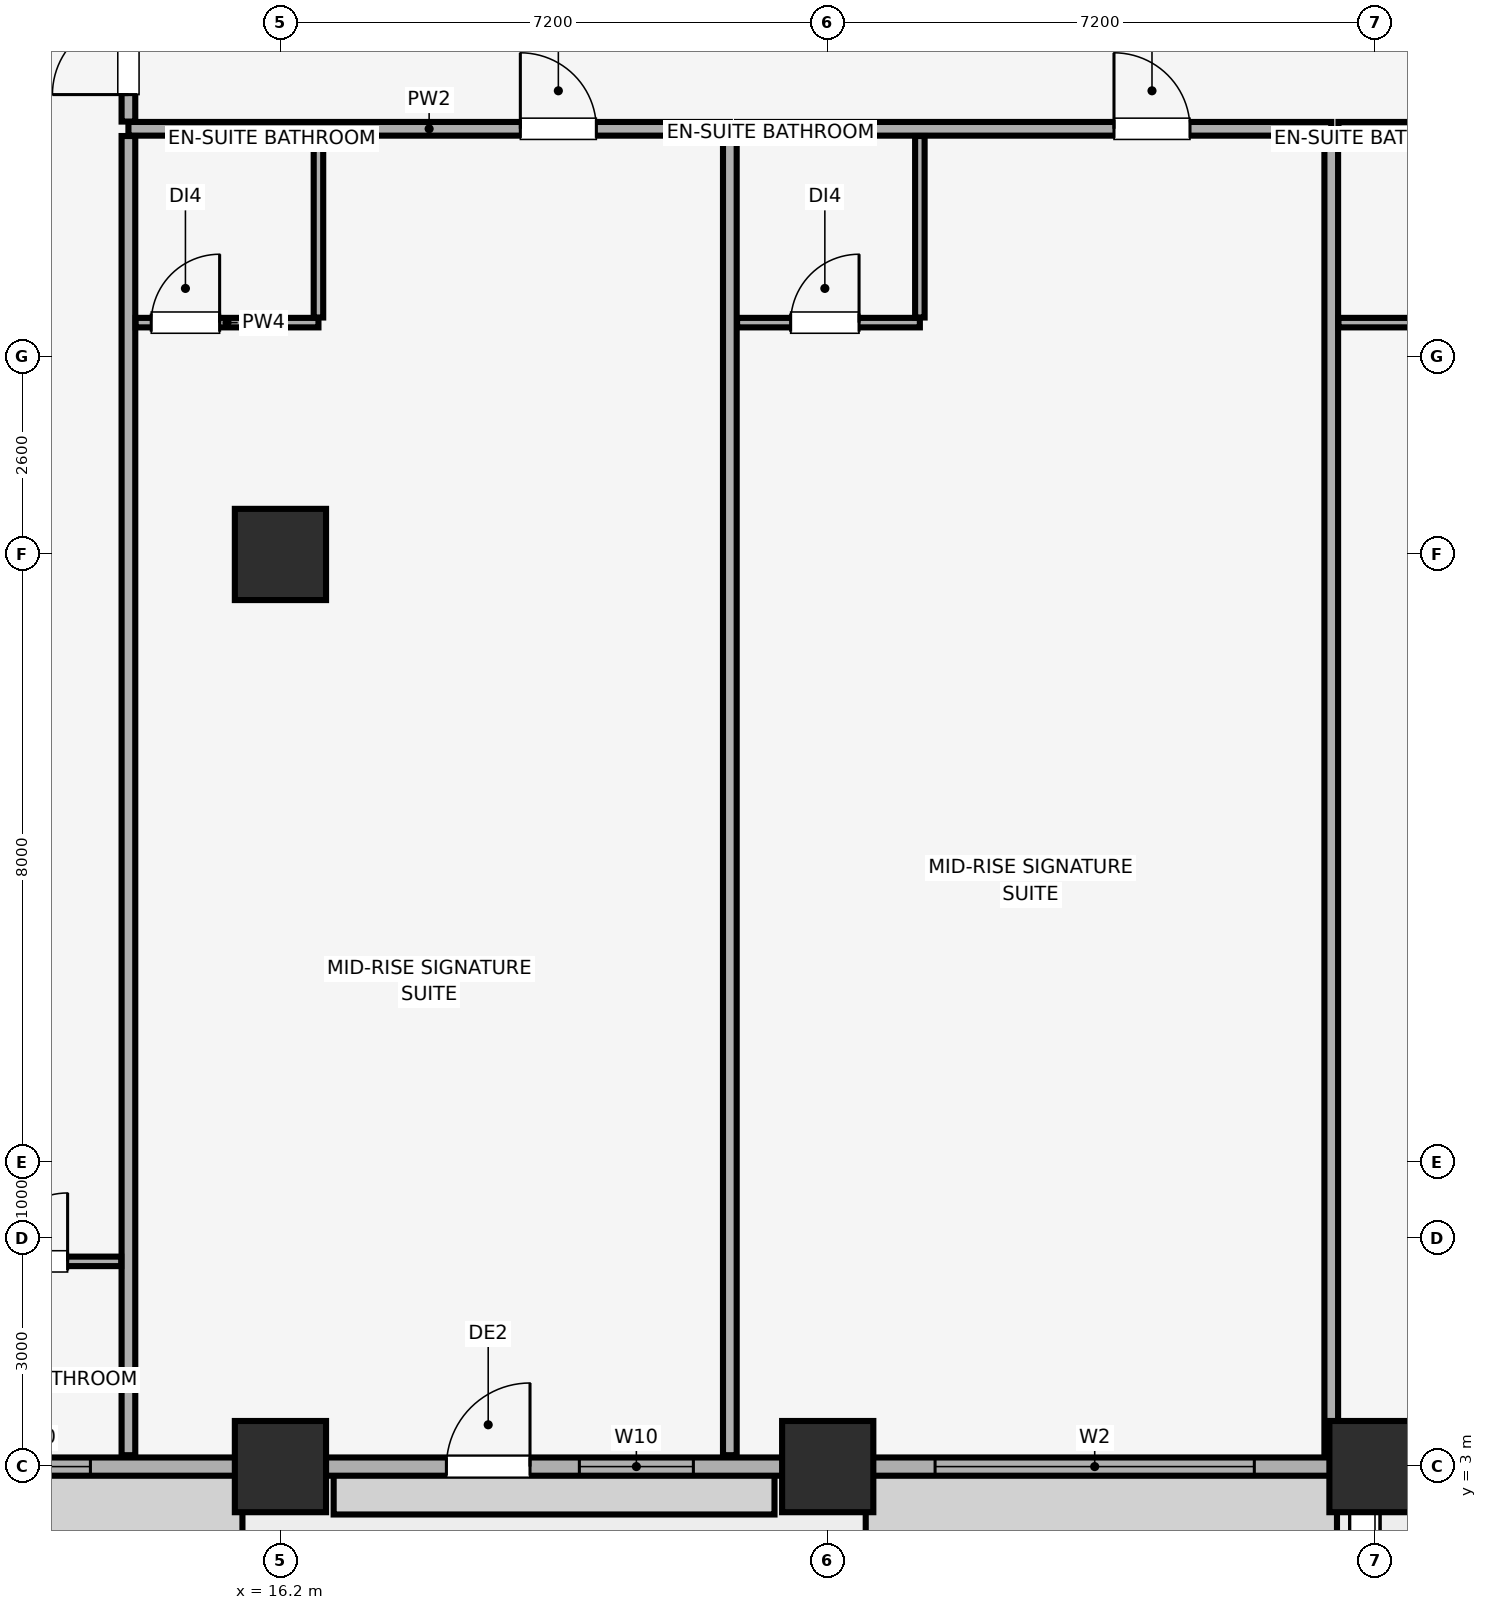
"""IFC4 building model, lengths in metres.
Left out: names, types, materials, properties, quantities, classifications, styles, units other than length and angle.
Written with IfcOpenShell. Run it as: python <this file> out.ifc"""

import sys

from ifc_helpers import new_model, si_unit, direction, frame, frame_2d, origin, origin_2d, place, context, subcontext, project, spatial, rectangle, extrude, element, fill, save


model = new_model("IFC4")
c1 = context("Model", 3, precision=1e-05, world=origin(), true_north=direction((0.0, 1.0)))
c2 = subcontext(c1, "Body", "Model", "MODEL_VIEW")
j1 = project(units=[si_unit("LENGTHUNIT", "METRE"), si_unit("PLANEANGLEUNIT", "RADIAN")], contexts=[c1])
p1 = place(None, origin())
s1 = spatial("IfcSite", under=j1, at=p1, CompositionType="ELEMENT")
p2 = place(p1, origin())
s2 = spatial("IfcBuilding", under=s1, at=p2, CompositionType="ELEMENT")
p3 = place(p2, frame((0.0, 0.0, 180.95)))
s3 = spatial("IfcBuildingStorey", under=s2, at=p3, CompositionType="ELEMENT", Elevation=180.95)
for number, where, z_axis, x_axis in (
    (1, (16.2, 3.0, 0.0), (0.0, 0.0, 1.0), (1.0, 0.0, 0.0)),
    (2, (23.4, 3.0, 0.0), (0.0, 0.0, 1.0), (1.0, 0.0, 0.0)),
    (3, (30.6, 3.0, 0.0), (0.0, 0.0, 1.0), (1.0, 0.0, 0.0)),
    (4, (16.2, 15.0, 0.0), (0.0, 0.0, 1.0), (1.0, 0.0, 0.0)),
):
    element("IfcColumn", number, at=place(p3, frame(where, z_axis=z_axis, x_axis=x_axis)), inside=s3, PredefinedType="COLUMN", context=c2, shape_type="SweptSolid", body=[
        extrude(rectangle(XDim=1.2, YDim=1.2, at=origin_2d()), origin(), (0.0, 0.0, 1.0), 3.45),
    ])
p4 = place(p3, frame((7.0, 3.0, 0.0), z_axis=(0.0, 0.0, 1.0), x_axis=(1.0, 0.0, 0.0)))
e5 = element("IfcWall", 5, at=p4, inside=s3, PredefinedType="SOLIDWALL", context=c2, shape_type="SweptSolid", body=[
    extrude(rectangle(XDim=70.0, YDim=0.24, at=frame_2d((35.0, 0.0))), origin(), (0.0, 0.0, 1.0), 2.65),
])
p5 = place(p4, frame((11.383, 0.0, 0.0)))
e6 = element("IfcOpeningElement", 6, at=p5, cuts=e5, PredefinedType="OPENING", context=c2, shape_type="SweptSolid", body=[
    extrude(rectangle(XDim=1.1, YDim=2.15, at=frame_2d((0.55, 1.075))), frame((0.0, 0.13, 0.0), z_axis=(0.0, -1.0, 0.0), x_axis=(1.0, 0.0, 0.0)), (0.0, 0.0, 1.0), 0.26),
])
p6 = place(p4, frame((34.45, 0.0, 0.0)))
e7 = element("IfcOpeningElement", 7, at=p6, cuts=e5, PredefinedType="OPENING", context=c2, shape_type="SweptSolid", body=[
    extrude(rectangle(XDim=1.1, YDim=2.15, at=frame_2d((0.55, 1.075))), frame((0.0, 0.13, 0.0), z_axis=(0.0, -1.0, 0.0), x_axis=(1.0, 0.0, 0.0)), (0.0, 0.0, 1.0), 0.26),
])
p7 = place(p4, frame((57.517, 0.0, 0.0)))
e8 = element("IfcOpeningElement", 8, at=p7, cuts=e5, PredefinedType="OPENING", context=c2, shape_type="SweptSolid", body=[
    extrude(rectangle(XDim=1.1, YDim=2.15, at=frame_2d((0.55, 1.075))), frame((0.0, 0.13, 0.0), z_axis=(0.0, -1.0, 0.0), x_axis=(1.0, 0.0, 0.0)), (0.0, 0.0, 1.0), 0.26),
])
p8 = place(p4, frame((5.2, 0.0, 0.85)))
e9 = element("IfcOpeningElement", 9, at=p8, cuts=e5, PredefinedType="OPENING", context=c2, shape_type="SweptSolid", body=[
    extrude(rectangle(XDim=1.5, YDim=1.4, at=frame_2d((0.75, 0.7))), frame((0.0, 0.13, 0.0), z_axis=(0.0, -1.0, 0.0), x_axis=(1.0, 0.0, 0.0)), (0.0, 0.0, 1.0), 0.26),
])
p9 = place(p4, frame((13.133, 0.0, 0.85)))
e10 = element("IfcOpeningElement", 10, at=p9, cuts=e5, PredefinedType="OPENING", context=c2, shape_type="SweptSolid", body=[
    extrude(rectangle(XDim=1.5, YDim=1.4, at=frame_2d((0.75, 0.7))), frame((0.0, 0.13, 0.0), z_axis=(0.0, -1.0, 0.0), x_axis=(1.0, 0.0, 0.0)), (0.0, 0.0, 1.0), 0.26),
])
p10 = place(p4, frame((17.812, 0.0, 0.85)))
e11 = element("IfcOpeningElement", 11, at=p10, cuts=e5, PredefinedType="OPENING", context=c2, shape_type="SweptSolid", body=[
    extrude(rectangle(XDim=4.2, YDim=1.65, at=frame_2d((2.1, 0.825))), frame((0.0, 0.13, 0.0), z_axis=(0.0, -1.0, 0.0), x_axis=(1.0, 0.0, 0.0)), (0.0, 0.0, 1.0), 0.26),
])
p11 = place(p4, frame((25.1, 0.0, 0.85)))
e12 = element("IfcOpeningElement", 12, at=p11, cuts=e5, PredefinedType="OPENING", context=c2, shape_type="SweptSolid", body=[
    extrude(rectangle(XDim=4.2, YDim=1.65, at=frame_2d((2.1, 0.825))), frame((0.0, 0.13, 0.0), z_axis=(0.0, -1.0, 0.0), x_axis=(1.0, 0.0, 0.0)), (0.0, 0.0, 1.0), 0.26),
])
p12 = place(p4, frame((31.99, 0.0, 0.85)))
e13 = element("IfcOpeningElement", 13, at=p12, cuts=e5, PredefinedType="OPENING", context=c2, shape_type="SweptSolid", body=[
    extrude(rectangle(XDim=1.5, YDim=1.4, at=frame_2d((0.75, 0.7))), frame((0.0, 0.13, 0.0), z_axis=(0.0, -1.0, 0.0), x_axis=(1.0, 0.0, 0.0)), (0.0, 0.0, 1.0), 0.26),
])
p13 = place(p4, frame((36.51, 0.0, 0.85)))
e14 = element("IfcOpeningElement", 14, at=p13, cuts=e5, PredefinedType="OPENING", context=c2, shape_type="SweptSolid", body=[
    extrude(rectangle(XDim=1.5, YDim=1.4, at=frame_2d((0.75, 0.7))), frame((0.0, 0.13, 0.0), z_axis=(0.0, -1.0, 0.0), x_axis=(1.0, 0.0, 0.0)), (0.0, 0.0, 1.0), 0.26),
])
p14 = place(p4, frame((40.7, 0.0, 0.85)))
e15 = element("IfcOpeningElement", 15, at=p14, cuts=e5, PredefinedType="OPENING", context=c2, shape_type="SweptSolid", body=[
    extrude(rectangle(XDim=4.2, YDim=1.65, at=frame_2d((2.1, 0.825))), frame((0.0, 0.13, 0.0), z_axis=(0.0, -1.0, 0.0), x_axis=(1.0, 0.0, 0.0)), (0.0, 0.0, 1.0), 0.26),
])
p15 = place(p4, frame((47.9, 0.0, 0.85)))
e16 = element("IfcOpeningElement", 16, at=p15, cuts=e5, PredefinedType="OPENING", context=c2, shape_type="SweptSolid", body=[
    extrude(rectangle(XDim=4.2, YDim=1.65, at=frame_2d((2.1, 0.825))), frame((0.0, 0.13, 0.0), z_axis=(0.0, -1.0, 0.0), x_axis=(1.0, 0.0, 0.0)), (0.0, 0.0, 1.0), 0.26),
])
p16 = place(p4, frame((55.314, 0.0, 0.85)))
e17 = element("IfcOpeningElement", 17, at=p16, cuts=e5, PredefinedType="OPENING", context=c2, shape_type="SweptSolid", body=[
    extrude(rectangle(XDim=1.5, YDim=1.4, at=frame_2d((0.75, 0.7))), frame((0.0, 0.13, 0.0), z_axis=(0.0, -1.0, 0.0), x_axis=(1.0, 0.0, 0.0)), (0.0, 0.0, 1.0), 0.26),
])
p17 = place(p4, frame((63.3, 0.0, 0.85)))
e18 = element("IfcOpeningElement", 18, at=p17, cuts=e5, PredefinedType="OPENING", context=c2, shape_type="SweptSolid", body=[
    extrude(rectangle(XDim=1.5, YDim=1.4, at=frame_2d((0.75, 0.7))), frame((0.0, 0.13, 0.0), z_axis=(0.0, -1.0, 0.0), x_axis=(1.0, 0.0, 0.0)), (0.0, 0.0, 1.0), 0.26),
])
p18 = place(p3, frame((14.2, 20.6, 0.0), z_axis=(0.0, 0.0, 1.0), x_axis=(1.0, 0.0, 0.0)))
e19 = element("IfcWall", 19, at=p18, inside=s3, PredefinedType="PARTITIONING", context=c2, shape_type="SweptSolid", body=[
    extrude(rectangle(XDim=7.912, YDim=0.18, at=frame_2d((3.956, 0.0))), origin(), (0.0, 0.0, 1.0), 3.45),
])
p19 = place(p18, frame((5.156, 0.0, 0.0)))
e20 = element("IfcOpeningElement", 20, at=p19, cuts=e19, PredefinedType="OPENING", context=c2, shape_type="SweptSolid", body=[
    extrude(rectangle(XDim=1.0, YDim=2.15, at=frame_2d((0.5, 1.075))), frame((0.0, 0.1, 0.0), z_axis=(0.0, -1.0, 0.0), x_axis=(1.0, 0.0, 0.0)), (0.0, 0.0, 1.0), 0.2),
])
for number, where, z_axis, x_axis in (
    (21, (14.2, 3.15, 0.0), (0.0, 0.0, 1.0), (0.0, 1.0, 0.0)),
    (22, (22.112, 3.15, 0.0), (0.0, 0.0, 1.0), (0.0, 1.0, 0.0)),
):
    element("IfcWall", number, at=place(p3, frame(where, z_axis=z_axis, x_axis=x_axis)), inside=s3, PredefinedType="PARTITIONING", context=c2, shape_type="SweptSolid", body=[
        extrude(rectangle(XDim=17.355, YDim=0.18, at=frame_2d((8.677, 0.0))), origin(), (0.0, 0.0, 1.0), 3.45),
    ])
p20 = place(p3, frame((14.295, 18.05, 0.0), z_axis=(0.0, 0.0, 1.0), x_axis=(1.0, 0.0, 0.0)))
e23 = element("IfcWall", 23, at=p20, inside=s3, PredefinedType="PARTITIONING", context=c2, shape_type="SweptSolid", body=[
    extrude(rectangle(XDim=2.405, YDim=0.125, at=frame_2d((1.203, 0.0))), origin(), (0.0, 0.0, 1.0), 3.45),
])
p21 = place(p20, frame((0.205, 0.0, 0.0)))
e24 = element("IfcOpeningElement", 24, at=p21, cuts=e23, PredefinedType="OPENING", context=c2, shape_type="SweptSolid", body=[
    extrude(rectangle(XDim=0.9, YDim=2.1, at=frame_2d((0.45, 1.05))), frame((0.0, 0.073, 0.0), z_axis=(0.0, -1.0, 0.0), x_axis=(1.0, 0.0, 0.0)), (0.0, 0.0, 1.0), 0.145),
])
p22 = place(p3, frame((16.7, 18.117, 0.0), z_axis=(0.0, 0.0, 1.0), x_axis=(0.0, 1.0, 0.0)))
e25 = element("IfcWall", 25, at=p22, inside=s3, PredefinedType="PARTITIONING", context=c2, shape_type="SweptSolid", body=[
    extrude(rectangle(XDim=2.387, YDim=0.125, at=frame_2d((1.194, 0.0))), origin(), (0.0, 0.0, 1.0), 3.45),
])
p23 = place(p3, frame((22.207, 20.6, 0.0), z_axis=(0.0, 0.0, 1.0), x_axis=(1.0, 0.0, 0.0)))
e26 = element("IfcWall", 26, at=p23, inside=s3, PredefinedType="PARTITIONING", context=c2, shape_type="SweptSolid", body=[
    extrude(rectangle(XDim=7.817, YDim=0.18, at=frame_2d((3.909, 0.0))), origin(), (0.0, 0.0, 1.0), 3.45),
])
p24 = place(p23, frame((4.959, 0.0, 0.0)))
e27 = element("IfcOpeningElement", 27, at=p24, cuts=e26, PredefinedType="OPENING", context=c2, shape_type="SweptSolid", body=[
    extrude(rectangle(XDim=1.0, YDim=2.15, at=frame_2d((0.5, 1.075))), frame((0.0, 0.1, 0.0), z_axis=(0.0, -1.0, 0.0), x_axis=(1.0, 0.0, 0.0)), (0.0, 0.0, 1.0), 0.2),
])
p25 = place(p3, frame((30.025, 3.15, 0.0), z_axis=(0.0, 0.0, 1.0), x_axis=(0.0, 1.0, 0.0)))
e28 = element("IfcWall", 28, at=p25, inside=s3, PredefinedType="PARTITIONING", context=c2, shape_type="SweptSolid", body=[
    extrude(rectangle(XDim=17.355, YDim=0.18, at=frame_2d((8.677, 0.0))), origin(), (0.0, 0.0, 1.0), 3.45),
])
p26 = place(p3, frame((22.207, 18.05, 0.0), z_axis=(0.0, 0.0, 1.0), x_axis=(1.0, 0.0, 0.0)))
e29 = element("IfcWall", 29, at=p26, inside=s3, PredefinedType="PARTITIONING", context=c2, shape_type="SweptSolid", body=[
    extrude(rectangle(XDim=2.405, YDim=0.125, at=frame_2d((1.203, 0.0))), origin(), (0.0, 0.0, 1.0), 3.45),
])
p27 = place(p26, frame((0.705, 0.0, 0.0)))
e30 = element("IfcOpeningElement", 30, at=p27, cuts=e29, PredefinedType="OPENING", context=c2, shape_type="SweptSolid", body=[
    extrude(rectangle(XDim=0.9, YDim=2.1, at=frame_2d((0.45, 1.05))), frame((0.0, 0.073, 0.0), z_axis=(0.0, -1.0, 0.0), x_axis=(1.0, 0.0, 0.0)), (0.0, 0.0, 1.0), 0.145),
])
p28 = place(p3, frame((24.612, 18.117, 0.0), z_axis=(0.0, 0.0, 1.0), x_axis=(0.0, 1.0, 0.0)))
e31 = element("IfcWall", 31, at=p28, inside=s3, PredefinedType="PARTITIONING", context=c2, shape_type="SweptSolid", body=[
    extrude(rectangle(XDim=2.387, YDim=0.125, at=frame_2d((1.194, 0.0))), origin(), (0.0, 0.0, 1.0), 3.45),
])
p29 = place(p3, frame((30.12, 20.6, 0.0), z_axis=(0.0, 0.0, 1.0), x_axis=(1.0, 0.0, 0.0)))
e32 = element("IfcWall", 32, at=p29, inside=s3, PredefinedType="PARTITIONING", context=c2, shape_type="SweptSolid", body=[
    extrude(rectangle(XDim=7.817, YDim=0.18, at=frame_2d((3.909, 0.0))), origin(), (0.0, 0.0, 1.0), 3.45),
])
p30 = place(p29, frame((4.603, 0.0, 0.0)))
e33 = element("IfcOpeningElement", 33, at=p30, cuts=e32, PredefinedType="OPENING", context=c2, shape_type="SweptSolid", body=[
    extrude(rectangle(XDim=1.0, YDim=2.15, at=frame_2d((0.5, 1.075))), frame((0.0, 0.1, 0.0), z_axis=(0.0, -1.0, 0.0), x_axis=(1.0, 0.0, 0.0)), (0.0, 0.0, 1.0), 0.2),
])
p31 = place(p3, frame((30.12, 18.05, 0.0), z_axis=(0.0, 0.0, 1.0), x_axis=(1.0, 0.0, 0.0)))
e34 = element("IfcWall", 34, at=p31, inside=s3, PredefinedType="PARTITIONING", context=c2, shape_type="SweptSolid", body=[
    extrude(rectangle(XDim=2.405, YDim=0.125, at=frame_2d((1.203, 0.0))), origin(), (0.0, 0.0, 1.0), 3.45),
])
p32 = place(p31, frame((1.205, 0.0, 0.0)))
e35 = element("IfcOpeningElement", 35, at=p32, cuts=e34, PredefinedType="OPENING", context=c2, shape_type="SweptSolid", body=[
    extrude(rectangle(XDim=0.9, YDim=2.1, at=frame_2d((0.45, 1.05))), frame((0.0, 0.073, 0.0), z_axis=(0.0, -1.0, 0.0), x_axis=(1.0, 0.0, 0.0)), (0.0, 0.0, 1.0), 0.145),
])
p33 = place(p3, frame((14.2, 20.695, 0.0), z_axis=(0.0, 0.0, 1.0), x_axis=(0.0, 1.0, 0.0)))
e36 = element("IfcWall", 36, at=p33, inside=s3, PredefinedType="PARTITIONING", context=c2, shape_type="SweptSolid", body=[
    extrude(rectangle(XDim=1.71, YDim=0.18, at=frame_2d((0.855, 0.0))), origin(), (0.0, 0.0, 1.0), 3.45),
])
p34 = place(p33, frame((0.355, 0.0, 0.0)))
e37 = element("IfcOpeningElement", 37, at=p34, cuts=e36, PredefinedType="OPENING", context=c2, shape_type="SweptSolid", body=[
    extrude(rectangle(XDim=1.0, YDim=2.15, at=frame_2d((0.5, 1.075))), frame((0.0, 0.1, 0.0), z_axis=(0.0, -1.0, 0.0), x_axis=(1.0, 0.0, 0.0)), (0.0, 0.0, 1.0), 0.2),
])
p35 = place(p3, frame((11.7, 5.7, 0.0), z_axis=(0.0, 0.0, 1.0), x_axis=(1.0, 0.0, 0.0)))
e38 = element("IfcWall", 38, at=p35, inside=s3, PredefinedType="PARTITIONING", context=c2, shape_type="SweptSolid", body=[
    extrude(rectangle(XDim=2.405, YDim=0.125, at=frame_2d((1.203, 0.0))), origin(), (0.0, 0.0, 1.0), 3.45),
])
p36 = place(p35, frame((0.8, 0.0, 0.0)))
e39 = element("IfcOpeningElement", 39, at=p36, cuts=e38, PredefinedType="OPENING", context=c2, shape_type="SweptSolid", body=[
    extrude(rectangle(XDim=0.9, YDim=2.1, at=frame_2d((0.45, 1.05))), frame((0.0, 0.073, 0.0), z_axis=(0.0, -1.0, 0.0), x_axis=(1.0, 0.0, 0.0)), (0.0, 0.0, 1.0), 0.145),
])
p37 = place(p5, origin())
e40 = element("IfcDoor", 40, at=p37, inside=s3, OperationType="SINGLE_SWING_RIGHT", PredefinedType="DOOR", context=c2, shape_type="SweptSolid", body=[
    extrude(rectangle(XDim=1.1, YDim=2.15, at=frame_2d((0.55, 1.075))), frame((0.0, 0.025, 0.0), z_axis=(0.0, -1.0, 0.0), x_axis=(1.0, 0.0, 0.0)), (0.0, 0.0, 1.0), 0.05),
])
fill(e6, e40)
p38 = place(p8, origin())
e41 = element("IfcWindow", 41, at=p38, inside=s3, PartitioningType="SINGLE_PANEL", PredefinedType="WINDOW", context=c2, shape_type="SweptSolid", body=[
    extrude(rectangle(XDim=1.5, YDim=1.4, at=frame_2d((0.75, 0.7))), frame((0.0, 0.03, 0.0), z_axis=(0.0, -1.0, 0.0), x_axis=(1.0, 0.0, 0.0)), (0.0, 0.0, 1.0), 0.06),
])
fill(e9, e41)
p39 = place(p9, origin())
e42 = element("IfcWindow", 42, at=p39, inside=s3, PartitioningType="SINGLE_PANEL", PredefinedType="WINDOW", context=c2, shape_type="SweptSolid", body=[
    extrude(rectangle(XDim=1.5, YDim=1.4, at=frame_2d((0.75, 0.7))), frame((0.0, 0.03, 0.0), z_axis=(0.0, -1.0, 0.0), x_axis=(1.0, 0.0, 0.0)), (0.0, 0.0, 1.0), 0.06),
])
fill(e10, e42)
p40 = place(p10, origin())
e43 = element("IfcWindow", 43, at=p40, inside=s3, PartitioningType="SINGLE_PANEL", PredefinedType="WINDOW", context=c2, shape_type="SweptSolid", body=[
    extrude(rectangle(XDim=4.2, YDim=1.65, at=frame_2d((2.1, 0.825))), frame((0.0, 0.03, 0.0), z_axis=(0.0, -1.0, 0.0), x_axis=(1.0, 0.0, 0.0)), (0.0, 0.0, 1.0), 0.06),
])
fill(e11, e43)
p41 = place(p19, origin())
e44 = element("IfcDoor", 44, at=p41, inside=s3, OperationType="SINGLE_SWING_LEFT", PredefinedType="DOOR", context=c2, shape_type="SweptSolid", body=[
    extrude(rectangle(XDim=1.0, YDim=2.15, at=frame_2d((0.5, 1.075))), frame((0.0, 0.025, 0.0), z_axis=(0.0, -1.0, 0.0), x_axis=(1.0, 0.0, 0.0)), (0.0, 0.0, 1.0), 0.05),
])
fill(e20, e44)
p42 = place(p21, origin())
e45 = element("IfcDoor", 45, at=p42, inside=s3, OperationType="SINGLE_SWING_RIGHT", PredefinedType="DOOR", context=c2, shape_type="SweptSolid", body=[
    extrude(rectangle(XDim=0.9, YDim=2.1, at=frame_2d((0.45, 1.05))), frame((0.0, 0.025, 0.0), z_axis=(0.0, -1.0, 0.0), x_axis=(1.0, 0.0, 0.0)), (0.0, 0.0, 1.0), 0.05),
])
fill(e24, e45)
p43 = place(p24, origin())
e46 = element("IfcDoor", 46, at=p43, inside=s3, OperationType="SINGLE_SWING_LEFT", PredefinedType="DOOR", context=c2, shape_type="SweptSolid", body=[
    extrude(rectangle(XDim=1.0, YDim=2.15, at=frame_2d((0.5, 1.075))), frame((0.0, 0.025, 0.0), z_axis=(0.0, -1.0, 0.0), x_axis=(1.0, 0.0, 0.0)), (0.0, 0.0, 1.0), 0.05),
])
fill(e27, e46)
p44 = place(p27, origin())
e47 = element("IfcDoor", 47, at=p44, inside=s3, OperationType="SINGLE_SWING_RIGHT", PredefinedType="DOOR", context=c2, shape_type="SweptSolid", body=[
    extrude(rectangle(XDim=0.9, YDim=2.1, at=frame_2d((0.45, 1.05))), frame((0.0, 0.025, 0.0), z_axis=(0.0, -1.0, 0.0), x_axis=(1.0, 0.0, 0.0)), (0.0, 0.0, 1.0), 0.05),
])
fill(e30, e47)
p45 = place(p34, origin())
e48 = element("IfcDoor", 48, at=p45, inside=s3, OperationType="SINGLE_SWING_LEFT", PredefinedType="DOOR", context=c2, shape_type="SweptSolid", body=[
    extrude(rectangle(XDim=1.0, YDim=2.15, at=frame_2d((0.5, 1.075))), frame((0.0, 0.025, 0.0), z_axis=(0.0, -1.0, 0.0), x_axis=(1.0, 0.0, 0.0)), (0.0, 0.0, 1.0), 0.05),
])
fill(e37, e48)
p46 = place(p36, origin())
e49 = element("IfcDoor", 49, at=p46, inside=s3, OperationType="SINGLE_SWING_RIGHT", PredefinedType="DOOR", context=c2, shape_type="SweptSolid", body=[
    extrude(rectangle(XDim=0.9, YDim=2.1, at=frame_2d((0.45, 1.05))), frame((0.0, 0.025, 0.0), z_axis=(0.0, -1.0, 0.0), x_axis=(1.0, 0.0, 0.0)), (0.0, 0.0, 1.0), 0.05),
])
fill(e39, e49)
save(model, sys.argv[1])
